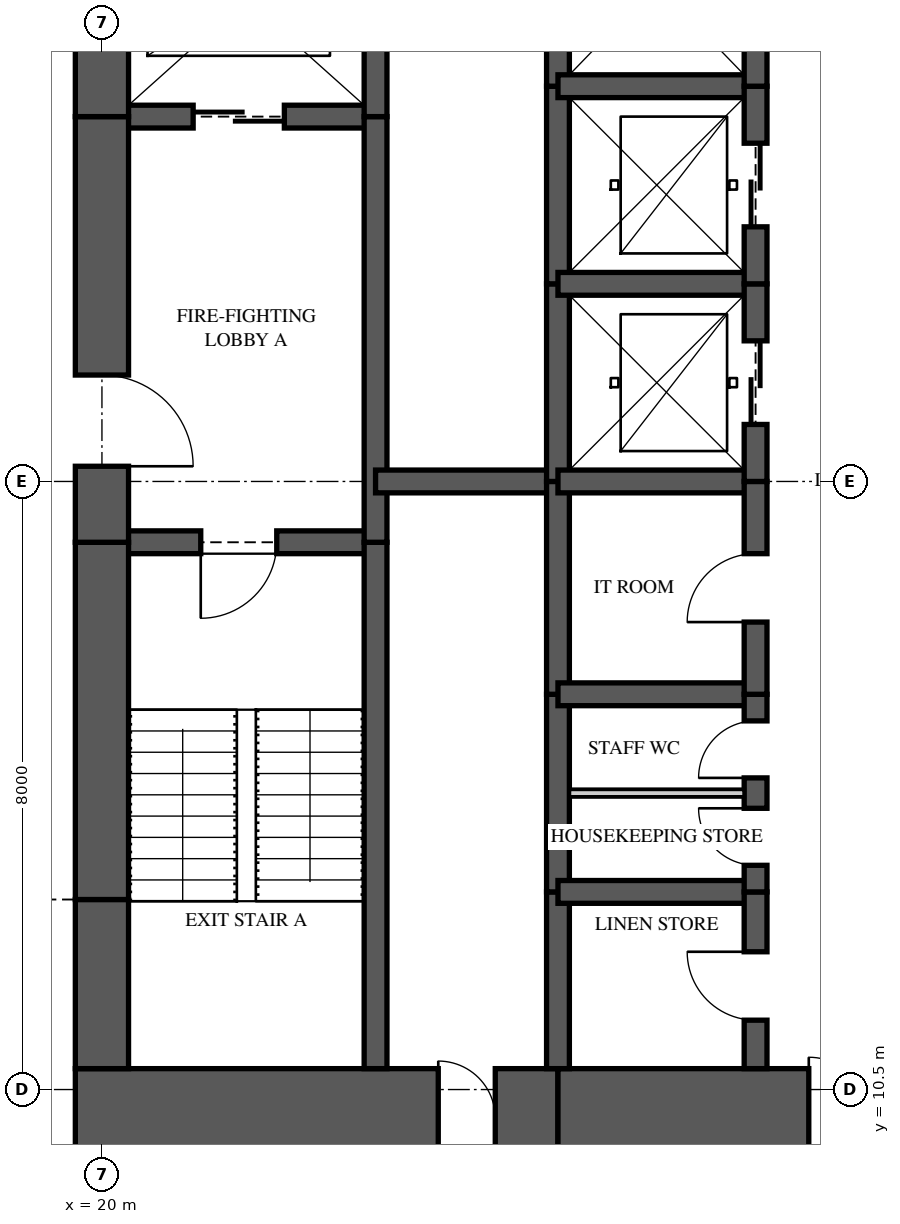
"""IFC4 building model, lengths in metres.
Left out: names, types, materials, properties, quantities, classifications, styles, units other than length and angle.
Written with IfcOpenShell. Run it as: python <this file> out.ifc"""

import sys

from ifc_helpers import new_model, si_unit, direction, frame, frame_2d, origin, place, context, subcontext, project, spatial, rectangle, extrude, element, fill, save


model = new_model("IFC4")
c1 = context("Model", 3, precision=1e-05, world=origin(), true_north=direction((0.0, 1.0)))
c2 = subcontext(c1, "Body", "Model", "MODEL_VIEW")
j1 = project(units=[si_unit("LENGTHUNIT", "METRE"), si_unit("PLANEANGLEUNIT", "RADIAN")], contexts=[c1])
p1 = place(None, origin())
s1 = spatial("IfcSite", under=j1, at=p1, CompositionType="ELEMENT")
p2 = place(p1, origin())
s2 = spatial("IfcBuilding", under=s1, at=p2, CompositionType="ELEMENT")
p3 = place(p2, frame((0.0, 0.0, 157.7)))
s3 = spatial("IfcBuildingStorey", under=s2, at=p3, CompositionType="ELEMENT", Elevation=157.7)
p4 = place(p3, frame((19.65, 10.125, 0.0), z_axis=(0.0, 0.0, 1.0), x_axis=(1.0, 0.0, 0.0)))
e1 = element("IfcWall", 1, at=p4, inside=s3, PredefinedType="SHEAR", context=c2, shape_type="SweptSolid", body=[
    extrude(rectangle(XDim=6.35, YDim=1.3, at=frame_2d((3.175, 0.0))), origin(), (0.0, 0.0, 1.0), 3.35),
])
p5 = place(p4, frame((4.775, 0.0, 0.0)))
e2 = element("IfcOpeningElement", 2, at=p5, cuts=e1, PredefinedType="OPENING", context=c2, shape_type="SweptSolid", body=[
    extrude(rectangle(XDim=0.75, YDim=2.1, at=frame_2d((0.375, 1.05))), frame((0.0, 0.66, 0.0), z_axis=(0.0, -1.0, 0.0), x_axis=(1.0, 0.0, 0.0)), (0.0, 0.0, 1.0), 1.32),
])
p6 = place(p3, frame((26.0, 10.125, 0.0), z_axis=(0.0, 0.0, 1.0), x_axis=(1.0, 0.0, 0.0)))
e3 = element("IfcWall", 3, at=p6, inside=s3, PredefinedType="SHEAR", context=c2, shape_type="SweptSolid", body=[
    extrude(rectangle(XDim=5.6, YDim=1.3, at=frame_2d((2.8, 0.0))), origin(), (0.0, 0.0, 1.0), 3.35),
])
p7 = place(p6, frame((3.3, 0.0, 0.0)))
e4 = element("IfcOpeningElement", 4, at=p7, cuts=e3, PredefinedType="OPENING", context=c2, shape_type="SweptSolid", body=[
    extrude(rectangle(XDim=1.6, YDim=2.1, at=frame_2d((0.8, 1.05))), frame((0.0, 0.66, 0.0), z_axis=(0.0, -1.0, 0.0), x_axis=(1.0, 0.0, 0.0)), (0.0, 0.0, 1.0), 1.32),
])
p8 = place(p3, frame((20.0, 26.225, 0.0), z_axis=(0.0, 0.0, 1.0), x_axis=(0.0, -1.0, 0.0)))
e5 = element("IfcWall", 5, at=p8, inside=s3, PredefinedType="SHEAR", context=c2, shape_type="SweptSolid", body=[
    extrude(rectangle(XDim=2.925, YDim=0.7, at=frame_2d((1.462, 0.0))), origin(), (0.0, 0.0, 1.0), 3.35),
])
p9 = place(p3, frame((20.0, 23.3, 0.0), z_axis=(0.0, 0.0, 1.0), x_axis=(0.0, -1.0, 0.0)))
e6 = element("IfcWall", 6, at=p9, inside=s3, PredefinedType="SHEAR", context=c2, shape_type="SweptSolid", body=[
    extrude(rectangle(XDim=5.6, YDim=0.7, at=frame_2d((2.8, 0.0))), origin(), (0.0, 0.0, 1.0), 3.35),
])
p10 = place(p9, frame((3.4, 0.0, 0.0)))
e7 = element("IfcOpeningElement", 7, at=p10, cuts=e6, PredefinedType="OPENING", context=c2, shape_type="SweptSolid", body=[
    extrude(rectangle(XDim=1.2, YDim=2.2, at=frame_2d((0.6, 1.1))), frame((0.0, 0.36, 0.0), z_axis=(0.0, -1.0, 0.0), x_axis=(1.0, 0.0, 0.0)), (0.0, 0.0, 1.0), 0.72),
])
p11 = place(p3, frame((20.0, 17.7, 0.0), z_axis=(0.0, 0.0, 1.0), x_axis=(0.0, -1.0, 0.0)))
e8 = element("IfcWall", 8, at=p11, inside=s3, PredefinedType="SHEAR", context=c2, shape_type="SweptSolid", body=[
    extrude(rectangle(XDim=4.7, YDim=0.7, at=frame_2d((2.35, 0.0))), origin(), (0.0, 0.0, 1.0), 3.35),
])
p12 = place(p3, frame((20.0, 13.0, 0.0), z_axis=(0.0, 0.0, 1.0), x_axis=(0.0, -1.0, 0.0)))
e9 = element("IfcWall", 9, at=p12, inside=s3, PredefinedType="SHEAR", context=c2, shape_type="SweptSolid", body=[
    extrude(rectangle(XDim=2.225, YDim=0.7, at=frame_2d((1.113, 0.0))), origin(), (0.0, 0.0, 1.0), 3.35),
])
p13 = place(p3, frame((23.6, 10.775, 0.0), z_axis=(0.0, 0.0, 1.0), x_axis=(0.0, 1.0, 0.0)))
e10 = element("IfcWall", 10, at=p13, inside=s3, PredefinedType="SHEAR", context=c2, shape_type="SweptSolid", body=[
    extrude(rectangle(XDim=6.925, YDim=0.3, at=frame_2d((3.462, 0.0))), origin(), (0.0, 0.0, 1.0), 3.35),
])
p14 = place(p3, frame((23.6, 17.7, 0.0), z_axis=(0.0, 0.0, 1.0), x_axis=(0.0, 1.0, 0.0)))
e11 = element("IfcWall", 11, at=p14, inside=s3, PredefinedType="SHEAR", context=c2, shape_type="SweptSolid", body=[
    extrude(rectangle(XDim=5.6, YDim=0.3, at=frame_2d((2.8, 0.0))), origin(), (0.0, 0.0, 1.0), 3.35),
])
p15 = place(p3, frame((23.6, 23.3, 0.0), z_axis=(0.0, 0.0, 1.0), x_axis=(0.0, 1.0, 0.0)))
e12 = element("IfcWall", 12, at=p15, inside=s3, PredefinedType="SHEAR", context=c2, shape_type="SweptSolid", body=[
    extrude(rectangle(XDim=2.925, YDim=0.3, at=frame_2d((1.462, 0.0))), origin(), (0.0, 0.0, 1.0), 3.35),
])
p16 = place(p3, frame((26.0, 10.775, 0.0), z_axis=(0.0, 0.0, 1.0), x_axis=(0.0, 1.0, 0.0)))
e13 = element("IfcWall", 13, at=p16, inside=s3, PredefinedType="SHEAR", context=c2, shape_type="SweptSolid", body=[
    extrude(rectangle(XDim=2.325, YDim=0.3, at=frame_2d((1.163, 0.0))), origin(), (0.0, 0.0, 1.0), 3.35),
])
p17 = place(p3, frame((26.0, 13.1, 0.0), z_axis=(0.0, 0.0, 1.0), x_axis=(0.0, 1.0, 0.0)))
e14 = element("IfcWall", 14, at=p17, inside=s3, PredefinedType="SHEAR", context=c2, shape_type="SweptSolid", body=[
    extrude(rectangle(XDim=2.6, YDim=0.3, at=frame_2d((1.3, 0.0))), origin(), (0.0, 0.0, 1.0), 3.35),
])
p18 = place(p3, frame((26.0, 15.7, 0.0), z_axis=(0.0, 0.0, 1.0), x_axis=(0.0, 1.0, 0.0)))
e15 = element("IfcWall", 15, at=p18, inside=s3, PredefinedType="SHEAR", context=c2, shape_type="SweptSolid", body=[
    extrude(rectangle(XDim=2.8, YDim=0.3, at=frame_2d((1.4, 0.0))), origin(), (0.0, 0.0, 1.0), 3.35),
])
p19 = place(p3, frame((26.0, 18.5, 0.0), z_axis=(0.0, 0.0, 1.0), x_axis=(0.0, 1.0, 0.0)))
e16 = element("IfcWall", 16, at=p19, inside=s3, PredefinedType="SHEAR", context=c2, shape_type="SweptSolid", body=[
    extrude(rectangle(XDim=2.6, YDim=0.3, at=frame_2d((1.3, 0.0))), origin(), (0.0, 0.0, 1.0), 3.35),
])
p20 = place(p3, frame((26.0, 21.1, 0.0), z_axis=(0.0, 0.0, 1.0), x_axis=(0.0, 1.0, 0.0)))
e17 = element("IfcWall", 17, at=p20, inside=s3, PredefinedType="SHEAR", context=c2, shape_type="SweptSolid", body=[
    extrude(rectangle(XDim=2.6, YDim=0.3, at=frame_2d((1.3, 0.0))), origin(), (0.0, 0.0, 1.0), 3.35),
])
p21 = place(p3, frame((26.0, 23.7, 0.0), z_axis=(0.0, 0.0, 1.0), x_axis=(0.0, 1.0, 0.0)))
e18 = element("IfcWall", 18, at=p21, inside=s3, PredefinedType="SHEAR", context=c2, shape_type="SweptSolid", body=[
    extrude(rectangle(XDim=2.525, YDim=0.3, at=frame_2d((1.263, 0.0))), origin(), (0.0, 0.0, 1.0), 3.35),
])
p22 = place(p3, frame((28.6, 10.775, 0.0), z_axis=(0.0, 0.0, 1.0), x_axis=(0.0, 1.0, 0.0)))
e19 = element("IfcWall", 19, at=p22, inside=s3, PredefinedType="SHEAR", context=c2, shape_type="SweptSolid", body=[
    extrude(rectangle(XDim=2.325, YDim=0.3, at=frame_2d((1.163, 0.0))), origin(), (0.0, 0.0, 1.0), 3.35),
])
p23 = place(p22, frame((0.637, 0.0, 0.0)))
e20 = element("IfcOpeningElement", 20, at=p23, cuts=e19, PredefinedType="OPENING", context=c2, shape_type="SweptSolid", body=[
    extrude(rectangle(XDim=0.9, YDim=2.1, at=frame_2d((0.45, 1.05))), frame((0.0, 0.16, 0.0), z_axis=(0.0, -1.0, 0.0), x_axis=(1.0, 0.0, 0.0)), (0.0, 0.0, 1.0), 0.32),
])
p24 = place(p3, frame((28.6, 13.1, 0.0), z_axis=(0.0, 0.0, 1.0), x_axis=(0.0, 1.0, 0.0)))
e21 = element("IfcWall", 21, at=p24, inside=s3, PredefinedType="SHEAR", context=c2, shape_type="SweptSolid", body=[
    extrude(rectangle(XDim=2.6, YDim=0.3, at=frame_2d((1.3, 0.0))), origin(), (0.0, 0.0, 1.0), 3.35),
])
p25 = place(p24, frame((0.35, 0.0, 0.0)))
e22 = element("IfcOpeningElement", 22, at=p25, cuts=e21, PredefinedType="OPENING", context=c2, shape_type="SweptSolid", body=[
    extrude(rectangle(XDim=0.75, YDim=2.1, at=frame_2d((0.375, 1.05))), frame((0.0, 0.16, 0.0), z_axis=(0.0, -1.0, 0.0), x_axis=(1.0, 0.0, 0.0)), (0.0, 0.0, 1.0), 0.32),
])
p26 = place(p24, frame((1.5, 0.0, 0.0)))
e23 = element("IfcOpeningElement", 23, at=p26, cuts=e21, PredefinedType="OPENING", context=c2, shape_type="SweptSolid", body=[
    extrude(rectangle(XDim=0.75, YDim=2.1, at=frame_2d((0.375, 1.05))), frame((0.0, 0.16, 0.0), z_axis=(0.0, -1.0, 0.0), x_axis=(1.0, 0.0, 0.0)), (0.0, 0.0, 1.0), 0.32),
])
p27 = place(p3, frame((28.6, 15.7, 0.0), z_axis=(0.0, 0.0, 1.0), x_axis=(0.0, 1.0, 0.0)))
e24 = element("IfcWall", 24, at=p27, inside=s3, PredefinedType="SHEAR", context=c2, shape_type="SweptSolid", body=[
    extrude(rectangle(XDim=2.8, YDim=0.3, at=frame_2d((1.4, 0.0))), origin(), (0.0, 0.0, 1.0), 3.35),
])
p28 = place(p27, frame((0.95, 0.0, 0.0)))
e25 = element("IfcOpeningElement", 25, at=p28, cuts=e24, PredefinedType="OPENING", context=c2, shape_type="SweptSolid", body=[
    extrude(rectangle(XDim=0.9, YDim=2.1, at=frame_2d((0.45, 1.05))), frame((0.0, 0.16, 0.0), z_axis=(0.0, -1.0, 0.0), x_axis=(1.0, 0.0, 0.0)), (0.0, 0.0, 1.0), 0.32),
])
p29 = place(p3, frame((28.6, 18.5, 0.0), z_axis=(0.0, 0.0, 1.0), x_axis=(0.0, 1.0, 0.0)))
e26 = element("IfcWall", 26, at=p29, inside=s3, PredefinedType="SHEAR", context=c2, shape_type="SweptSolid", body=[
    extrude(rectangle(XDim=2.6, YDim=0.3, at=frame_2d((1.3, 0.0))), origin(), (0.0, 0.0, 1.0), 3.35),
])
p30 = place(p29, frame((0.75, 0.0, 0.0)))
e27 = element("IfcOpeningElement", 27, at=p30, cuts=e26, PredefinedType="OPENING", context=c2, shape_type="SweptSolid", body=[
    extrude(rectangle(XDim=1.1, YDim=2.1, at=frame_2d((0.55, 1.05))), frame((0.0, 0.16, 0.0), z_axis=(0.0, -1.0, 0.0), x_axis=(1.0, 0.0, 0.0)), (0.0, 0.0, 1.0), 0.32),
])
p31 = place(p3, frame((28.6, 21.1, 0.0), z_axis=(0.0, 0.0, 1.0), x_axis=(0.0, 1.0, 0.0)))
e28 = element("IfcWall", 28, at=p31, inside=s3, PredefinedType="SHEAR", context=c2, shape_type="SweptSolid", body=[
    extrude(rectangle(XDim=2.6, YDim=0.3, at=frame_2d((1.3, 0.0))), origin(), (0.0, 0.0, 1.0), 3.35),
])
p32 = place(p31, frame((0.75, 0.0, 0.0)))
e29 = element("IfcOpeningElement", 29, at=p32, cuts=e28, PredefinedType="OPENING", context=c2, shape_type="SweptSolid", body=[
    extrude(rectangle(XDim=1.1, YDim=2.1, at=frame_2d((0.55, 1.05))), frame((0.0, 0.16, 0.0), z_axis=(0.0, -1.0, 0.0), x_axis=(1.0, 0.0, 0.0)), (0.0, 0.0, 1.0), 0.32),
])
p33 = place(p3, frame((28.6, 23.7, 0.0), z_axis=(0.0, 0.0, 1.0), x_axis=(0.0, 1.0, 0.0)))
e30 = element("IfcWall", 30, at=p33, inside=s3, PredefinedType="SHEAR", context=c2, shape_type="SweptSolid", body=[
    extrude(rectangle(XDim=2.525, YDim=0.3, at=frame_2d((1.263, 0.0))), origin(), (0.0, 0.0, 1.0), 3.35),
])
p34 = place(p33, frame((0.85, 0.0, 0.0)))
e31 = element("IfcOpeningElement", 31, at=p34, cuts=e30, PredefinedType="OPENING", context=c2, shape_type="SweptSolid", body=[
    extrude(rectangle(XDim=1.1, YDim=2.1, at=frame_2d((0.55, 1.05))), frame((0.0, 0.16, 0.0), z_axis=(0.0, -1.0, 0.0), x_axis=(1.0, 0.0, 0.0)), (0.0, 0.0, 1.0), 0.32),
])
p35 = place(p3, frame((20.0, 17.7, 0.0), z_axis=(0.0, 0.0, 1.0), x_axis=(1.0, 0.0, 0.0)))
e32 = element("IfcWall", 32, at=p35, inside=s3, PredefinedType="SHEAR", context=c2, shape_type="SweptSolid", body=[
    extrude(rectangle(XDim=3.6, YDim=0.3, at=frame_2d((1.8, 0.0))), origin(), (0.0, 0.0, 1.0), 3.35),
])
p36 = place(p35, frame((1.3, 0.0, 0.0)))
e33 = element("IfcOpeningElement", 33, at=p36, cuts=e32, PredefinedType="OPENING", context=c2, shape_type="SweptSolid", body=[
    extrude(rectangle(XDim=1.0, YDim=2.1, at=frame_2d((0.5, 1.05))), frame((0.0, 0.16, 0.0), z_axis=(0.0, -1.0, 0.0), x_axis=(1.0, 0.0, 0.0)), (0.0, 0.0, 1.0), 0.32),
])
p37 = place(p3, frame((20.0, 23.3, 0.0), z_axis=(0.0, 0.0, 1.0), x_axis=(1.0, 0.0, 0.0)))
e34 = element("IfcWall", 34, at=p37, inside=s3, PredefinedType="SHEAR", context=c2, shape_type="SweptSolid", body=[
    extrude(rectangle(XDim=3.6, YDim=0.3, at=frame_2d((1.8, 0.0))), origin(), (0.0, 0.0, 1.0), 3.35),
])
p38 = place(p37, frame((1.2, 0.0, 0.0)))
e35 = element("IfcOpeningElement", 35, at=p38, cuts=e34, PredefinedType="OPENING", context=c2, shape_type="SweptSolid", body=[
    extrude(rectangle(XDim=1.2, YDim=2.1, at=frame_2d((0.6, 1.05))), frame((0.0, 0.16, 0.0), z_axis=(0.0, -1.0, 0.0), x_axis=(1.0, 0.0, 0.0)), (0.0, 0.0, 1.0), 0.32),
])
p39 = place(p3, frame((23.6, 18.5, 0.0), z_axis=(0.0, 0.0, 1.0), x_axis=(1.0, 0.0, 0.0)))
e36 = element("IfcWall", 36, at=p39, inside=s3, PredefinedType="SHEAR", context=c2, shape_type="SweptSolid", body=[
    extrude(rectangle(XDim=2.4, YDim=0.3, at=frame_2d((1.2, 0.0))), origin(), (0.0, 0.0, 1.0), 3.35),
])
for number, where, z_axis, x_axis in (
    (37, (26.0, 13.1, 0.0), (0.0, 0.0, 1.0), (1.0, 0.0, 0.0)),
    (38, (26.0, 15.7, 0.0), (0.0, 0.0, 1.0), (1.0, 0.0, 0.0)),
    (39, (26.0, 18.5, 0.0), (0.0, 0.0, 1.0), (1.0, 0.0, 0.0)),
    (40, (26.0, 21.1, 0.0), (0.0, 0.0, 1.0), (1.0, 0.0, 0.0)),
    (41, (26.0, 23.7, 0.0), (0.0, 0.0, 1.0), (1.0, 0.0, 0.0)),
):
    element("IfcWall", number, at=place(p3, frame(where, z_axis=z_axis, x_axis=x_axis)), inside=s3, PredefinedType="SHEAR", context=c2, shape_type="SweptSolid", body=[
        extrude(rectangle(XDim=2.6, YDim=0.3, at=frame_2d((1.3, 0.0))), origin(), (0.0, 0.0, 1.0), 3.35),
    ])
p40 = place(p3, frame((26.15, 14.4, 0.0), z_axis=(0.0, 0.0, 1.0), x_axis=(1.0, 0.0, 0.0)))
e42 = element("IfcWall", 42, at=p40, inside=s3, PredefinedType="PARTITIONING", context=c2, shape_type="SweptSolid", body=[
    extrude(rectangle(XDim=2.3, YDim=0.1, at=frame_2d((1.15, 0.0))), origin(), (0.0, 0.0, 1.0), 3.11),
])
p41 = place(p36, frame((1.0, 0.0, 0.0), z_axis=(0.0, 0.0, 1.0), x_axis=(-1.0, 0.0, 0.0)))
e43 = element("IfcDoor", 43, at=p41, inside=s3, OperationType="SINGLE_SWING_RIGHT", PredefinedType="DOOR", context=c2, shape_type="SweptSolid", body=[
    extrude(rectangle(XDim=1.0, YDim=2.1, at=frame_2d((0.5, 1.05))), frame((0.0, 0.025, 0.0), z_axis=(0.0, -1.0, 0.0), x_axis=(1.0, 0.0, 0.0)), (0.0, 0.0, 1.0), 0.05),
])
fill(e33, e43)
p42 = place(p10, origin())
e44 = element("IfcDoor", 44, at=p42, inside=s3, OperationType="SINGLE_SWING_RIGHT", PredefinedType="DOOR", context=c2, shape_type="SweptSolid", body=[
    extrude(rectangle(XDim=1.2, YDim=2.2, at=frame_2d((0.6, 1.1))), frame((0.0, 0.025, 0.0), z_axis=(0.0, -1.0, 0.0), x_axis=(1.0, 0.0, 0.0)), (0.0, 0.0, 1.0), 0.05),
])
fill(e7, e44)
p43 = place(p38, origin())
e45 = element("IfcDoor", 45, at=p43, inside=s3, OperationType="SLIDING_TO_LEFT", PredefinedType="DOOR", context=c2, shape_type="SweptSolid", body=[
    extrude(rectangle(XDim=1.2, YDim=2.1, at=frame_2d((0.6, 1.05))), frame((0.0, 0.025, 0.0), z_axis=(0.0, -1.0, 0.0), x_axis=(1.0, 0.0, 0.0)), (0.0, 0.0, 1.0), 0.05),
])
fill(e35, e45)
p44 = place(p30, origin())
e46 = element("IfcDoor", 46, at=p44, inside=s3, OperationType="SLIDING_TO_LEFT", PredefinedType="DOOR", context=c2, shape_type="SweptSolid", body=[
    extrude(rectangle(XDim=1.1, YDim=2.1, at=frame_2d((0.55, 1.05))), frame((0.0, 0.025, 0.0), z_axis=(0.0, -1.0, 0.0), x_axis=(1.0, 0.0, 0.0)), (0.0, 0.0, 1.0), 0.05),
])
fill(e27, e46)
p45 = place(p32, origin())
e47 = element("IfcDoor", 47, at=p45, inside=s3, OperationType="SLIDING_TO_LEFT", PredefinedType="DOOR", context=c2, shape_type="SweptSolid", body=[
    extrude(rectangle(XDim=1.1, YDim=2.1, at=frame_2d((0.55, 1.05))), frame((0.0, 0.025, 0.0), z_axis=(0.0, -1.0, 0.0), x_axis=(1.0, 0.0, 0.0)), (0.0, 0.0, 1.0), 0.05),
])
fill(e29, e47)
p46 = place(p23, origin())
e48 = element("IfcDoor", 48, at=p46, inside=s3, OperationType="SINGLE_SWING_RIGHT", PredefinedType="DOOR", context=c2, shape_type="SweptSolid", body=[
    extrude(rectangle(XDim=0.9, YDim=2.1, at=frame_2d((0.45, 1.05))), frame((0.0, 0.025, 0.0), z_axis=(0.0, -1.0, 0.0), x_axis=(1.0, 0.0, 0.0)), (0.0, 0.0, 1.0), 0.05),
])
fill(e20, e48)
p47 = place(p25, origin())
e49 = element("IfcDoor", 49, at=p47, inside=s3, OperationType="SINGLE_SWING_RIGHT", PredefinedType="DOOR", context=c2, shape_type="SweptSolid", body=[
    extrude(rectangle(XDim=0.75, YDim=2.1, at=frame_2d((0.375, 1.05))), frame((0.0, 0.025, 0.0), z_axis=(0.0, -1.0, 0.0), x_axis=(1.0, 0.0, 0.0)), (0.0, 0.0, 1.0), 0.05),
])
fill(e22, e49)
p48 = place(p26, origin())
e50 = element("IfcDoor", 50, at=p48, inside=s3, OperationType="SINGLE_SWING_LEFT", PredefinedType="DOOR", context=c2, shape_type="SweptSolid", body=[
    extrude(rectangle(XDim=0.75, YDim=2.1, at=frame_2d((0.375, 1.05))), frame((0.0, 0.025, 0.0), z_axis=(0.0, -1.0, 0.0), x_axis=(1.0, 0.0, 0.0)), (0.0, 0.0, 1.0), 0.05),
])
fill(e23, e50)
p49 = place(p28, origin())
e51 = element("IfcDoor", 51, at=p49, inside=s3, OperationType="SINGLE_SWING_LEFT", PredefinedType="DOOR", context=c2, shape_type="SweptSolid", body=[
    extrude(rectangle(XDim=0.9, YDim=2.1, at=frame_2d((0.45, 1.05))), frame((0.0, 0.025, 0.0), z_axis=(0.0, -1.0, 0.0), x_axis=(1.0, 0.0, 0.0)), (0.0, 0.0, 1.0), 0.05),
])
fill(e25, e51)
p50 = place(p7, origin())
e52 = element("IfcDoor", 52, at=p50, inside=s3, OperationType="DOUBLE_DOOR_SINGLE_SWING", PredefinedType="DOOR", context=c2, shape_type="SweptSolid", body=[
    extrude(rectangle(XDim=1.6, YDim=2.1, at=frame_2d((0.8, 1.05))), frame((0.0, 0.025, 0.0), z_axis=(0.0, -1.0, 0.0), x_axis=(1.0, 0.0, 0.0)), (0.0, 0.0, 1.0), 0.05),
])
fill(e4, e52)
p51 = place(p5, origin())
e53 = element("IfcDoor", 53, at=p51, inside=s3, OperationType="SINGLE_SWING_LEFT", PredefinedType="DOOR", context=c2, shape_type="SweptSolid", body=[
    extrude(rectangle(XDim=0.75, YDim=2.1, at=frame_2d((0.375, 1.05))), frame((0.0, 0.025, 0.0), z_axis=(0.0, -1.0, 0.0), x_axis=(1.0, 0.0, 0.0)), (0.0, 0.0, 1.0), 0.05),
])
fill(e2, e53)
save(model, sys.argv[1])
